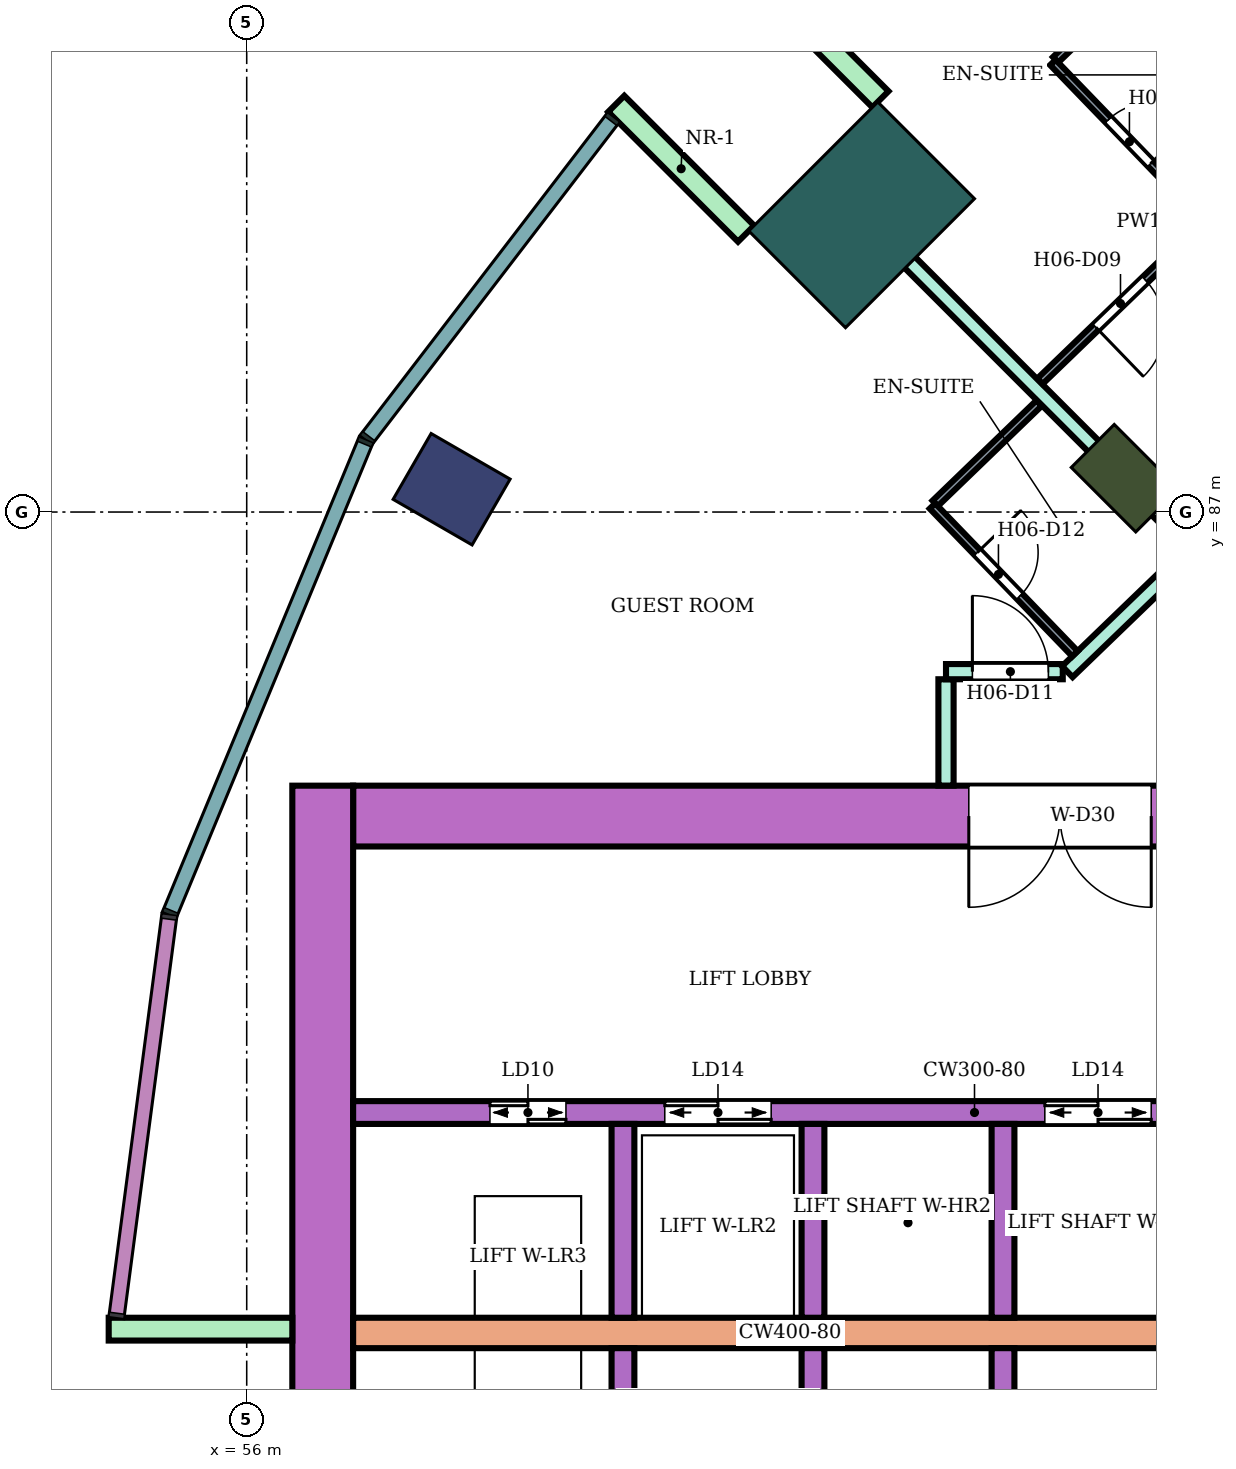
"""IFC4 building model, lengths in metres.
Left out: names, types, materials, properties, quantities, classifications, styles, units other than length and angle.
Written with IfcOpenShell. Run it as: python <this file> out.ifc"""

import sys

from ifc_helpers import new_model, si_unit, direction, frame, frame_2d, origin, origin_2d, place, context, subcontext, project, spatial, rectangle, extrude, element, fill, save


model = new_model("IFC4")
c1 = context("Model", 3, precision=1e-05, world=origin(), true_north=direction((0.0, 1.0)))
c2 = subcontext(c1, "Body", "Model", "MODEL_VIEW")
j1 = project(units=[si_unit("LENGTHUNIT", "METRE"), si_unit("PLANEANGLEUNIT", "RADIAN")], contexts=[c1])
p1 = place(None, origin())
s1 = spatial("IfcSite", under=j1, at=p1, CompositionType="ELEMENT")
p2 = place(p1, origin())
s2 = spatial("IfcBuilding", under=s1, at=p2, CompositionType="ELEMENT")
p3 = place(p2, frame((0.0, 0.0, 101.4)))
s3 = spatial("IfcBuildingStorey", under=s2, at=p3, CompositionType="ELEMENT", Elevation=101.4)
p4 = place(p3, frame((58.696, 87.3, 0.0), z_axis=(0.0, 0.0, 1.0), x_axis=(-0.866025403784, 0.5, 0.0)))
e1 = element("IfcColumn", 1, at=p4, inside=s3, PredefinedType="COLUMN", context=c2, shape_type="SweptSolid", body=[
    extrude(rectangle(XDim=1.2, YDim=1.0, at=origin_2d()), origin(), (0.0, 0.0, 1.0), 3.8),
])
p5 = place(p3, frame((67.555, 87.445, 0.0), z_axis=(0.0, 0.0, 1.0), x_axis=(-0.707106781187, 0.707106781187, 0.0)))
e2 = element("IfcColumn", 2, at=p5, inside=s3, PredefinedType="COLUMN", context=c2, shape_type="SweptSolid", body=[
    extrude(rectangle(XDim=1.2, YDim=0.8, at=origin_2d()), origin(), (0.0, 0.0, 1.0), 3.8),
])
p6 = place(p3, frame((64.09, 90.91, 0.0), z_axis=(0.0, 0.0, 1.0), x_axis=(-0.707106781187, 0.707106781187, 0.0)))
e3 = element("IfcColumn", 3, at=p6, inside=s3, PredefinedType="COLUMN", context=c2, shape_type="SweptSolid", body=[
    extrude(rectangle(XDim=1.8, YDim=2.4, at=origin_2d()), origin(), (0.0, 0.0, 1.0), 3.8),
])
p7 = place(p3, frame((72.1, 83.0, 0.0), z_axis=(0.0, 0.0, 1.0), x_axis=(-1.0, 0.0, 0.0)))
e4 = element("IfcWall", 4, at=p7, inside=s3, PredefinedType="SHEAR", context=c2, shape_type="SweptSolid", body=[
    extrude(rectangle(XDim=14.7, YDim=0.8, at=frame_2d((7.35, 0.0))), origin(), (0.0, 0.0, 1.0), 3.48),
])
p8 = place(p7, frame((4.2, 0.0, 0.0)))
e5 = element("IfcOpeningElement", 5, at=p8, cuts=e4, PredefinedType="OPENING", context=c2, shape_type="SweptSolid", body=[
    extrude(rectangle(XDim=2.4, YDim=2.4, at=frame_2d((1.2, 1.2))), frame((0.0, 0.41, 0.0), z_axis=(0.0, -1.0, 0.0), x_axis=(1.0, 0.0, 0.0)), (0.0, 0.0, 1.0), 0.82),
])
p9 = place(p3, frame((57.0, 83.4, 0.0), z_axis=(0.0, 0.0, 1.0), x_axis=(0.0, -1.0, 0.0)))
e6 = element("IfcWall", 6, at=p9, inside=s3, PredefinedType="SHEAR", context=c2, shape_type="SweptSolid", body=[
    extrude(rectangle(XDim=16.8, YDim=0.8, at=frame_2d((8.4, 0.0))), origin(), (0.0, 0.0, 1.0), 3.48),
])
p10 = place(p3, frame((68.3, 76.2, 0.0), z_axis=(0.0, 0.0, 1.0), x_axis=(-1.0, 0.0, 0.0)))
e7 = element("IfcWall", 7, at=p10, inside=s3, PredefinedType="SHEAR", context=c2, shape_type="SweptSolid", body=[
    extrude(rectangle(XDim=10.9, YDim=0.4, at=frame_2d((5.45, 0.0))), origin(), (0.0, 0.0, 1.0), 3.48),
])
p11 = place(p3, frame((68.3, 79.1, 0.0), z_axis=(0.0, 0.0, 1.0), x_axis=(-1.0, 0.0, 0.0)))
e8 = element("IfcWall", 8, at=p11, inside=s3, PredefinedType="SHEAR", context=c2, shape_type="SweptSolid", body=[
    extrude(rectangle(XDim=10.9, YDim=0.3, at=frame_2d((5.45, 0.0))), origin(), (0.0, 0.0, 1.0), 3.48),
])
p12 = place(p11, frame((0.4, 0.0, 0.0)))
e9 = element("IfcOpeningElement", 9, at=p12, cuts=e8, PredefinedType="OPENING", context=c2, shape_type="SweptSolid", body=[
    extrude(rectangle(XDim=1.4, YDim=2.1, at=frame_2d((0.7, 1.05))), frame((0.0, 0.16, 0.0), z_axis=(0.0, -1.0, 0.0), x_axis=(1.0, 0.0, 0.0)), (0.0, 0.0, 1.0), 0.32),
])
p13 = place(p11, frame((5.4, 0.0, 0.0)))
e10 = element("IfcOpeningElement", 10, at=p13, cuts=e8, PredefinedType="OPENING", context=c2, shape_type="SweptSolid", body=[
    extrude(rectangle(XDim=1.4, YDim=2.1, at=frame_2d((0.7, 1.05))), frame((0.0, 0.16, 0.0), z_axis=(0.0, -1.0, 0.0), x_axis=(1.0, 0.0, 0.0)), (0.0, 0.0, 1.0), 0.32),
])
p14 = place(p11, frame((8.1, 0.0, 0.0)))
e11 = element("IfcOpeningElement", 11, at=p14, cuts=e8, PredefinedType="OPENING", context=c2, shape_type="SweptSolid", body=[
    extrude(rectangle(XDim=1.0, YDim=2.1, at=frame_2d((0.5, 1.05))), frame((0.0, 0.16, 0.0), z_axis=(0.0, -1.0, 0.0), x_axis=(1.0, 0.0, 0.0)), (0.0, 0.0, 1.0), 0.32),
])
for number, where, z_axis, x_axis in (
    (12, (65.95, 76.0, 0.0), (0.0, 0.0, 1.0), (0.0, -1.0, 0.0)),
    (13, (63.45, 76.0, 0.0), (0.0, 0.0, 1.0), (0.0, -1.0, 0.0)),
    (14, (60.95, 76.0, 0.0), (0.0, 0.0, 1.0), (0.0, -1.0, 0.0)),
    (15, (65.95, 78.95, 0.0), (0.0, 0.0, 1.0), (0.0, -1.0, 0.0)),
    (16, (63.45, 78.95, 0.0), (0.0, 0.0, 1.0), (0.0, -1.0, 0.0)),
    (17, (60.95, 78.95, 0.0), (0.0, 0.0, 1.0), (0.0, -1.0, 0.0)),
):
    element("IfcWall", number, at=place(p3, frame(where, z_axis=z_axis, x_axis=x_axis)), inside=s3, PredefinedType="SHEAR", context=c2, shape_type="SweptSolid", body=[
        extrude(rectangle(XDim=2.55, YDim=0.3, at=frame_2d((1.275, 0.0))), origin(), (0.0, 0.0, 1.0), 3.48),
    ])
for number, where, z_axis, x_axis in (
    (18, (64.338, 92.43, 0.0), (0.0, 0.0, 1.0), (-0.707, 0.707, 0.0)),
    (19, (62.57, 90.662, 0.0), (0.0, 0.0, 1.0), (-0.707, 0.707, 0.0)),
    (20, (56.6, 76.25, 0.0), (0.0, 0.0, 1.0), (-1.0, 0.0, 0.0)),
):
    element("IfcWall", number, at=place(p3, frame(where, z_axis=z_axis, x_axis=x_axis)), inside=s3, PredefinedType="NOTDEFINED", context=c2, shape_type="SweptSolid", body=[
        extrude(rectangle(XDim=2.416, YDim=0.3, at=frame_2d((1.208, 0.0))), origin(), (0.0, 0.0, 1.0), 3.8),
    ])
p15 = place(p3, frame((63.6, 91.409, 0.0), z_axis=(0.0, 0.0, 1.0), x_axis=(0.706945318761, -0.707268206752, 0.0)))
e21 = element("IfcWall", 21, at=p15, inside=s3, PredefinedType="PARTITIONING", context=c2, shape_type="SweptSolid", body=[
    extrude(rectangle(XDim=6.805, YDim=0.2, at=frame_2d((3.402, 0.0))), origin(), (0.0, 0.0, 1.0), 3.35),
])
p16 = place(p3, frame((65.2, 83.401, 0.0), z_axis=(0.0, 0.0, 1.0), x_axis=(0.0, 1.0, 0.0)))
e22 = element("IfcWall", 22, at=p16, inside=s3, PredefinedType="PARTITIONING", context=c2, shape_type="SweptSolid", body=[
    extrude(rectangle(XDim=1.399, YDim=0.2, at=frame_2d((0.7, 0.0))), origin(), (0.0, 0.0, 1.0), 3.35),
])
p17 = place(p3, frame((65.2, 84.9, 0.0), z_axis=(0.0, 0.0, 1.0), x_axis=(1.0, 0.0, 0.0)))
e23 = element("IfcWall", 23, at=p17, inside=s3, PredefinedType="PARTITIONING", context=c2, shape_type="SweptSolid", body=[
    extrude(rectangle(XDim=1.536, YDim=0.2, at=frame_2d((0.768, 0.0))), origin(), (0.0, 0.0, 1.0), 3.35),
])
p18 = place(p17, frame((0.347, 0.0, 0.0)))
e24 = element("IfcOpeningElement", 24, at=p18, cuts=e23, PredefinedType="OPENING", context=c2, shape_type="SweptSolid", body=[
    extrude(rectangle(XDim=1.0, YDim=2.1, at=frame_2d((0.5, 1.05))), frame((0.0, 0.11, 0.0), z_axis=(0.0, -1.0, 0.0), x_axis=(1.0, 0.0, 0.0)), (0.0, 0.0, 1.0), 0.22),
])
p19 = place(p3, frame((66.796, 84.9, 0.0), z_axis=(0.0, 0.0, 1.0), x_axis=(0.719690784855, 0.694294731505, 0.0)))
e25 = element("IfcWall", 25, at=p19, inside=s3, PredefinedType="PARTITIONING", context=c2, shape_type="SweptSolid", body=[
    extrude(rectangle(XDim=6.585, YDim=0.2, at=frame_2d((3.292, 0.0))), origin(), (0.0, 0.0, 1.0), 3.35),
])
p20 = place(p19, frame((4.006, 0.0, 0.0)))
e26 = element("IfcOpeningElement", 26, at=p20, cuts=e25, PredefinedType="OPENING", context=c2, shape_type="SweptSolid", body=[
    extrude(rectangle(XDim=1.0, YDim=2.1, at=frame_2d((0.5, 1.05))), frame((0.0, 0.11, 0.0), z_axis=(0.0, -1.0, 0.0), x_axis=(1.0, 0.0, 0.0)), (0.0, 0.0, 1.0), 0.22),
])
p21 = place(p3, frame((67.102, 97.342, 0.0), z_axis=(0.0, 0.0, 1.0), x_axis=(0.499900389553, -0.866082906265, 0.0)))
e27 = element("IfcWall", 27, at=p21, inside=s3, PredefinedType="PARTITIONING", context=c2, shape_type="SweptSolid", body=[
    extrude(rectangle(XDim=8.908, YDim=0.2, at=frame_2d((4.454, 0.0))), origin(), (0.0, 0.0, 1.0), 3.35),
])
p22 = place(p3, frame((65.058, 87.114, 0.0), z_axis=(0.0, 0.0, 1.0), x_axis=(0.719653890619, 0.694332973232, 0.0)))
e28 = element("IfcWall", 28, at=p22, inside=s3, PredefinedType="PARTITIONING", context=c2, shape_type="SweptSolid", body=[
    extrude(rectangle(XDim=1.899, YDim=0.1, at=frame_2d((0.95, 0.0))), origin(), (0.0, 0.0, 1.0), 3.35),
])
p23 = place(p3, frame((65.022, 87.079, 0.0), z_axis=(0.0, 0.0, 1.0), x_axis=(0.694287838235, -0.719697434815, 0.0)))
e29 = element("IfcWall", 29, at=p23, inside=s3, PredefinedType="PARTITIONING", context=c2, shape_type="SweptSolid", body=[
    extrude(rectangle(XDim=2.7, YDim=0.1, at=frame_2d((1.35, 0.0))), origin(), (0.0, 0.0, 1.0), 3.35),
])
p24 = place(p23, frame((0.85, 0.0, 0.0)))
e30 = element("IfcOpeningElement", 30, at=p24, cuts=e29, PredefinedType="OPENING", context=c2, shape_type="SweptSolid", body=[
    extrude(rectangle(XDim=0.8, YDim=2.1, at=frame_2d((0.4, 1.05))), frame((0.0, 0.06, 0.0), z_axis=(0.0, -1.0, 0.0), x_axis=(1.0, 0.0, 0.0)), (0.0, 0.0, 1.0), 0.12),
])
p25 = place(p3, frame((66.436, 88.72, 0.0), z_axis=(0.0, 0.0, 1.0), x_axis=(0.719585934284, 0.694403400899, 0.0)))
e31 = element("IfcWall", 31, at=p25, inside=s3, PredefinedType="PARTITIONING", context=c2, shape_type="SweptSolid", body=[
    extrude(rectangle(XDim=4.925, YDim=0.1, at=frame_2d((2.462, 0.0))), origin(), (0.0, 0.0, 1.0), 3.35),
])
p26 = place(p25, frame((1.022, 0.0, 0.0)))
e32 = element("IfcOpeningElement", 32, at=p26, cuts=e31, PredefinedType="OPENING", context=c2, shape_type="SweptSolid", body=[
    extrude(rectangle(XDim=0.9, YDim=2.1, at=frame_2d((0.45, 1.05))), frame((0.0, 0.06, 0.0), z_axis=(0.0, -1.0, 0.0), x_axis=(1.0, 0.0, 0.0)), (0.0, 0.0, 1.0), 0.12),
])
p27 = place(p3, frame((66.642, 92.95, 0.0), z_axis=(0.0, 0.0, 1.0), x_axis=(0.719667412702, 0.694318957753, 0.0)))
e33 = element("IfcWall", 33, at=p27, inside=s3, PredefinedType="PARTITIONING", context=c2, shape_type="SweptSolid", body=[
    extrude(rectangle(XDim=2.562, YDim=0.1, at=frame_2d((1.281, 0.0))), origin(), (0.0, 0.0, 1.0), 3.35),
])
p28 = place(p3, frame((66.606, 92.915, 0.0), z_axis=(0.0, 0.0, 1.0), x_axis=(0.694403413121, -0.71958592249, 0.0)))
e34 = element("IfcWall", 34, at=p28, inside=s3, PredefinedType="PARTITIONING", context=c2, shape_type="SweptSolid", body=[
    extrude(rectangle(XDim=2.85, YDim=0.1, at=frame_2d((1.425, 0.0))), origin(), (0.0, 0.0, 1.0), 3.35),
])
p29 = place(p28, frame((1.05, 0.0, 0.0)))
e35 = element("IfcOpeningElement", 35, at=p29, cuts=e34, PredefinedType="OPENING", context=c2, shape_type="SweptSolid", body=[
    extrude(rectangle(XDim=0.8, YDim=2.1, at=frame_2d((0.4, 1.05))), frame((0.0, 0.06, 0.0), z_axis=(0.0, -1.0, 0.0), x_axis=(1.0, 0.0, 0.0)), (0.0, 0.0, 1.0), 0.12),
])
p30 = place(p26, frame((0.9, 0.0, 0.0), z_axis=(0.0, 0.0, 1.0), x_axis=(-1.0, 0.0, 0.0)))
e36 = element("IfcDoor", 36, at=p30, inside=s3, OperationType="SINGLE_SWING_RIGHT", PredefinedType="DOOR", context=c2, shape_type="SweptSolid", body=[
    extrude(rectangle(XDim=0.9, YDim=2.1, at=frame_2d((0.45, 1.05))), frame((0.0, 0.025, 0.0), z_axis=(0.0, -1.0, 0.0), x_axis=(1.0, 0.0, 0.0)), (0.0, 0.0, 1.0), 0.05),
])
fill(e32, e36)
p31 = place(p29, origin())
e37 = element("IfcDoor", 37, at=p31, inside=s3, OperationType="SINGLE_SWING_RIGHT", PredefinedType="DOOR", context=c2, shape_type="SweptSolid", body=[
    extrude(rectangle(XDim=0.8, YDim=2.1, at=frame_2d((0.4, 1.05))), frame((0.0, 0.025, 0.0), z_axis=(0.0, -1.0, 0.0), x_axis=(1.0, 0.0, 0.0)), (0.0, 0.0, 1.0), 0.05),
])
fill(e35, e37)
p32 = place(p18, origin())
e38 = element("IfcDoor", 38, at=p32, inside=s3, OperationType="SINGLE_SWING_LEFT", PredefinedType="DOOR", context=c2, shape_type="SweptSolid", body=[
    extrude(rectangle(XDim=1.0, YDim=2.1, at=frame_2d((0.5, 1.05))), frame((0.0, 0.025, 0.0), z_axis=(0.0, -1.0, 0.0), x_axis=(1.0, 0.0, 0.0)), (0.0, 0.0, 1.0), 0.05),
])
fill(e24, e38)
p33 = place(p24, origin())
e39 = element("IfcDoor", 39, at=p33, inside=s3, OperationType="SINGLE_SWING_LEFT", PredefinedType="DOOR", context=c2, shape_type="SweptSolid", body=[
    extrude(rectangle(XDim=0.8, YDim=2.1, at=frame_2d((0.4, 1.05))), frame((0.0, 0.025, 0.0), z_axis=(0.0, -1.0, 0.0), x_axis=(1.0, 0.0, 0.0)), (0.0, 0.0, 1.0), 0.05),
])
fill(e30, e39)
p34 = place(p12, origin())
e40 = element("IfcDoor", 40, at=p34, inside=s3, OperationType="DOUBLE_DOOR_SLIDING", PredefinedType="DOOR", context=c2, shape_type="SweptSolid", body=[
    extrude(rectangle(XDim=1.4, YDim=2.1, at=frame_2d((0.7, 1.05))), frame((0.0, 0.025, 0.0), z_axis=(0.0, -1.0, 0.0), x_axis=(1.0, 0.0, 0.0)), (0.0, 0.0, 1.0), 0.05),
])
fill(e9, e40)
p35 = place(p13, origin())
e41 = element("IfcDoor", 41, at=p35, inside=s3, OperationType="DOUBLE_DOOR_SLIDING", PredefinedType="DOOR", context=c2, shape_type="SweptSolid", body=[
    extrude(rectangle(XDim=1.4, YDim=2.1, at=frame_2d((0.7, 1.05))), frame((0.0, 0.025, 0.0), z_axis=(0.0, -1.0, 0.0), x_axis=(1.0, 0.0, 0.0)), (0.0, 0.0, 1.0), 0.05),
])
fill(e10, e41)
p36 = place(p14, origin())
e42 = element("IfcDoor", 42, at=p36, inside=s3, OperationType="DOUBLE_DOOR_SLIDING", PredefinedType="DOOR", context=c2, shape_type="SweptSolid", body=[
    extrude(rectangle(XDim=1.0, YDim=2.1, at=frame_2d((0.5, 1.05))), frame((0.0, 0.025, 0.0), z_axis=(0.0, -1.0, 0.0), x_axis=(1.0, 0.0, 0.0)), (0.0, 0.0, 1.0), 0.05),
])
fill(e11, e42)
p37 = place(p8, origin())
e43 = element("IfcDoor", 43, at=p37, inside=s3, OperationType="DOUBLE_DOOR_SINGLE_SWING", PredefinedType="DOOR", context=c2, shape_type="SweptSolid", body=[
    extrude(rectangle(XDim=2.4, YDim=2.4, at=frame_2d((1.2, 1.2))), frame((0.0, 0.025, 0.0), z_axis=(0.0, -1.0, 0.0), x_axis=(1.0, 0.0, 0.0)), (0.0, 0.0, 1.0), 0.05),
])
fill(e5, e43)
save(model, sys.argv[1])
